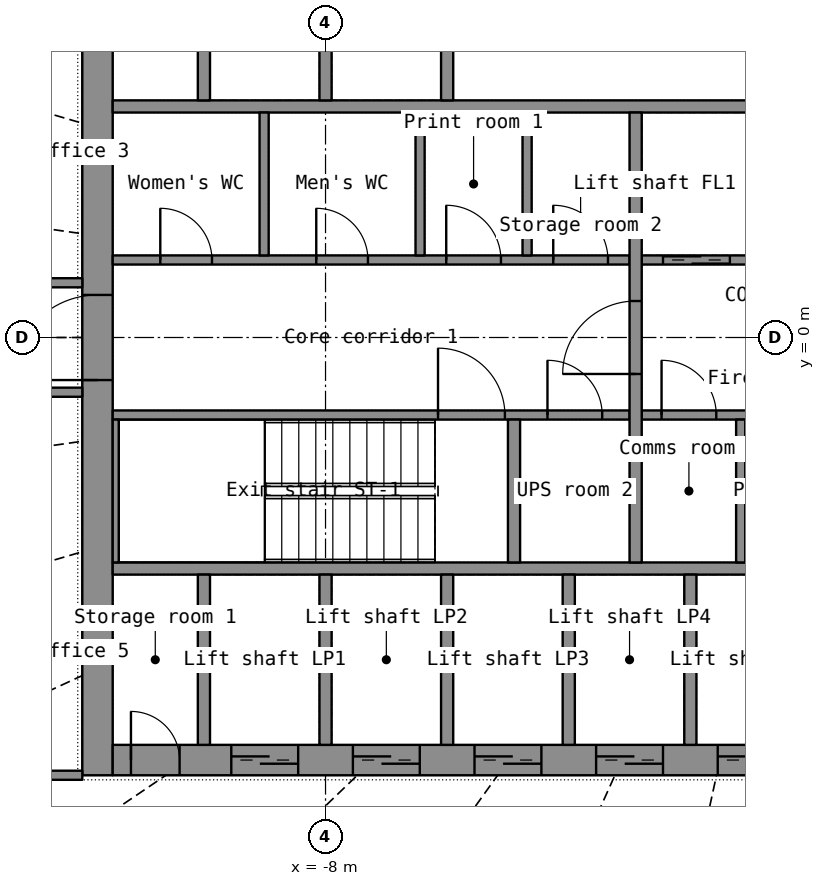
"""IFC4 building model, lengths in metres.
Left out: names, types, materials, properties, quantities, classifications, styles, units other than length and angle.
Written with IfcOpenShell. Run it as: python <this file> out.ifc"""

import sys

from ifc_helpers import new_model, si_unit, direction, frame, frame_2d, origin, place, context, subcontext, project, spatial, rectangle, extrude, element, fill, save


model = new_model("IFC4")
c1 = context("Model", 3, precision=1e-05, world=origin(), true_north=direction((0.0, 1.0)))
c2 = subcontext(c1, "Body", "Model", "MODEL_VIEW")
j1 = project(units=[si_unit("LENGTHUNIT", "METRE"), si_unit("PLANEANGLEUNIT", "RADIAN")], contexts=[c1])
p1 = place(None, origin())
s1 = spatial("IfcSite", under=j1, at=p1, CompositionType="ELEMENT")
p2 = place(p1, origin())
s2 = spatial("IfcBuilding", under=s1, at=p2, CompositionType="ELEMENT")
p3 = place(p2, frame((0.0, 0.0, 97.1)))
s3 = spatial("IfcBuildingStorey", under=s2, at=p3, CompositionType="ELEMENT", Elevation=97.1)
p4 = place(p3, frame((-11.75, -7.2, 0.0), z_axis=(0.0, 0.0, 1.0), x_axis=(0.0, 1.0, 0.0)))
e1 = element("IfcWall", 1, at=p4, inside=s3, PredefinedType="SHEAR", context=c2, shape_type="SweptSolid", body=[
    extrude(rectangle(XDim=14.4, YDim=0.5, at=frame_2d((7.2, 0.0))), origin(), (0.0, 0.0, 1.0), 3.3),
])
p5 = place(p4, frame((6.5, 0.0, 0.0)))
e2 = element("IfcOpeningElement", 2, at=p5, cuts=e1, PredefinedType="OPENING", context=c2, shape_type="SweptSolid", body=[
    extrude(rectangle(XDim=1.4, YDim=2.2, at=frame_2d((0.7, 1.1))), frame((0.0, 0.26, 0.0), z_axis=(0.0, -1.0, 0.0), x_axis=(1.0, 0.0, 0.0)), (0.0, 0.0, 1.0), 0.52),
])
p6 = place(p3, frame((-11.5, -6.95, 0.0), z_axis=(0.0, 0.0, 1.0), x_axis=(1.0, 0.0, 0.0)))
e3 = element("IfcWall", 3, at=p6, inside=s3, PredefinedType="SHEAR", context=c2, shape_type="SweptSolid", body=[
    extrude(rectangle(XDim=23.0, YDim=0.5, at=frame_2d((11.5, 0.0))), origin(), (0.0, 0.0, 1.0), 3.3),
])
p7 = place(p6, frame((1.95, 0.0, 0.0)))
e4 = element("IfcOpeningElement", 4, at=p7, cuts=e3, PredefinedType="OPENING", context=c2, shape_type="SweptSolid", body=[
    extrude(rectangle(XDim=1.1, YDim=2.2, at=frame_2d((0.55, 1.1))), frame((0.0, 0.26, 0.0), z_axis=(0.0, -1.0, 0.0), x_axis=(1.0, 0.0, 0.0)), (0.0, 0.0, 1.0), 0.52),
])
p8 = place(p6, frame((3.95, 0.0, 0.0)))
e5 = element("IfcOpeningElement", 5, at=p8, cuts=e3, PredefinedType="OPENING", context=c2, shape_type="SweptSolid", body=[
    extrude(rectangle(XDim=1.1, YDim=2.2, at=frame_2d((0.55, 1.1))), frame((0.0, 0.26, 0.0), z_axis=(0.0, -1.0, 0.0), x_axis=(1.0, 0.0, 0.0)), (0.0, 0.0, 1.0), 0.52),
])
p9 = place(p6, frame((5.95, 0.0, 0.0)))
e6 = element("IfcOpeningElement", 6, at=p9, cuts=e3, PredefinedType="OPENING", context=c2, shape_type="SweptSolid", body=[
    extrude(rectangle(XDim=1.1, YDim=2.2, at=frame_2d((0.55, 1.1))), frame((0.0, 0.26, 0.0), z_axis=(0.0, -1.0, 0.0), x_axis=(1.0, 0.0, 0.0)), (0.0, 0.0, 1.0), 0.52),
])
p10 = place(p6, frame((7.95, 0.0, 0.0)))
e7 = element("IfcOpeningElement", 7, at=p10, cuts=e3, PredefinedType="OPENING", context=c2, shape_type="SweptSolid", body=[
    extrude(rectangle(XDim=1.1, YDim=2.2, at=frame_2d((0.55, 1.1))), frame((0.0, 0.26, 0.0), z_axis=(0.0, -1.0, 0.0), x_axis=(1.0, 0.0, 0.0)), (0.0, 0.0, 1.0), 0.52),
])
p11 = place(p6, frame((9.95, 0.0, 0.0)))
e8 = element("IfcOpeningElement", 8, at=p11, cuts=e3, PredefinedType="OPENING", context=c2, shape_type="SweptSolid", body=[
    extrude(rectangle(XDim=1.1, YDim=2.2, at=frame_2d((0.55, 1.1))), frame((0.0, 0.26, 0.0), z_axis=(0.0, -1.0, 0.0), x_axis=(1.0, 0.0, 0.0)), (0.0, 0.0, 1.0), 0.52),
])
p12 = place(p6, frame((11.95, 0.0, 0.0)))
e9 = element("IfcOpeningElement", 9, at=p12, cuts=e3, PredefinedType="OPENING", context=c2, shape_type="SweptSolid", body=[
    extrude(rectangle(XDim=1.1, YDim=2.2, at=frame_2d((0.55, 1.1))), frame((0.0, 0.26, 0.0), z_axis=(0.0, -1.0, 0.0), x_axis=(1.0, 0.0, 0.0)), (0.0, 0.0, 1.0), 0.52),
])
p13 = place(p6, frame((13.95, 0.0, 0.0)))
e10 = element("IfcOpeningElement", 10, at=p13, cuts=e3, PredefinedType="OPENING", context=c2, shape_type="SweptSolid", body=[
    extrude(rectangle(XDim=1.1, YDim=2.2, at=frame_2d((0.55, 1.1))), frame((0.0, 0.26, 0.0), z_axis=(0.0, -1.0, 0.0), x_axis=(1.0, 0.0, 0.0)), (0.0, 0.0, 1.0), 0.52),
])
p14 = place(p6, frame((15.95, 0.0, 0.0)))
e11 = element("IfcOpeningElement", 11, at=p14, cuts=e3, PredefinedType="OPENING", context=c2, shape_type="SweptSolid", body=[
    extrude(rectangle(XDim=1.1, YDim=2.2, at=frame_2d((0.55, 1.1))), frame((0.0, 0.26, 0.0), z_axis=(0.0, -1.0, 0.0), x_axis=(1.0, 0.0, 0.0)), (0.0, 0.0, 1.0), 0.52),
])
p15 = place(p6, frame((19.95, 0.0, 0.0)))
e12 = element("IfcOpeningElement", 12, at=p15, cuts=e3, PredefinedType="OPENING", context=c2, shape_type="SweptSolid", body=[
    extrude(rectangle(XDim=1.1, YDim=2.2, at=frame_2d((0.55, 1.1))), frame((0.0, 0.26, 0.0), z_axis=(0.0, -1.0, 0.0), x_axis=(1.0, 0.0, 0.0)), (0.0, 0.0, 1.0), 0.52),
])
p16 = place(p6, frame((0.3, 0.0, 0.0)))
e13 = element("IfcOpeningElement", 13, at=p16, cuts=e3, PredefinedType="OPENING", context=c2, shape_type="SweptSolid", body=[
    extrude(rectangle(XDim=0.8, YDim=2.05, at=frame_2d((0.4, 1.025))), frame((0.0, 0.26, 0.0), z_axis=(0.0, -1.0, 0.0), x_axis=(1.0, 0.0, 0.0)), (0.0, 0.0, 1.0), 0.52),
])
p17 = place(p6, frame((21.9, 0.0, 0.0)))
e14 = element("IfcOpeningElement", 14, at=p17, cuts=e3, PredefinedType="OPENING", context=c2, shape_type="SweptSolid", body=[
    extrude(rectangle(XDim=0.8, YDim=2.05, at=frame_2d((0.4, 1.025))), frame((0.0, 0.26, 0.0), z_axis=(0.0, -1.0, 0.0), x_axis=(1.0, 0.0, 0.0)), (0.0, 0.0, 1.0), 0.52),
])
for number, where, z_axis, x_axis in (
    (15, (-11.5, -3.8, 0.0), (0.0, 0.0, 1.0), (1.0, 0.0, 0.0)),
    (16, (-11.5, 3.8, 0.0), (0.0, 0.0, 1.0), (1.0, 0.0, 0.0)),
):
    element("IfcWall", number, at=place(p3, frame(where, z_axis=z_axis, x_axis=x_axis)), inside=s3, PredefinedType="SHEAR", context=c2, shape_type="SweptSolid", body=[
        extrude(rectangle(XDim=23.0, YDim=0.2, at=frame_2d((11.5, 0.0))), origin(), (0.0, 0.0, 1.0), 3.3),
    ])
for number, where, z_axis, x_axis in (
    (17, (-10.0, -6.7, 0.0), (0.0, 0.0, 1.0), (0.0, 1.0, 0.0)),
    (18, (-8.0, -6.7, 0.0), (0.0, 0.0, 1.0), (0.0, 1.0, 0.0)),
    (19, (-6.0, -6.7, 0.0), (0.0, 0.0, 1.0), (0.0, 1.0, 0.0)),
    (20, (-4.0, -6.7, 0.0), (0.0, 0.0, 1.0), (0.0, 1.0, 0.0)),
    (21, (-2.0, -6.7, 0.0), (0.0, 0.0, 1.0), (0.0, 1.0, 0.0)),
    (22, (-10.0, 3.9, 0.0), (0.0, 0.0, 1.0), (0.0, 1.0, 0.0)),
    (23, (-8.0, 3.9, 0.0), (0.0, 0.0, 1.0), (0.0, 1.0, 0.0)),
    (24, (-6.0, 3.9, 0.0), (0.0, 0.0, 1.0), (0.0, 1.0, 0.0)),
):
    element("IfcWall", number, at=place(p3, frame(where, z_axis=z_axis, x_axis=x_axis)), inside=s3, PredefinedType="SHEAR", context=c2, shape_type="SweptSolid", body=[
        extrude(rectangle(XDim=2.8, YDim=0.2, at=frame_2d((1.4, 0.0))), origin(), (0.0, 0.0, 1.0), 3.3),
    ])
p18 = place(p3, frame((-11.5, -1.275, 0.0), z_axis=(0.0, 0.0, 1.0), x_axis=(1.0, 0.0, 0.0)))
e25 = element("IfcWall", 25, at=p18, inside=s3, PredefinedType="SHEAR", context=c2, shape_type="SweptSolid", body=[
    extrude(rectangle(XDim=8.5, YDim=0.15, at=frame_2d((4.25, 0.0))), origin(), (0.0, 0.0, 1.0), 3.3),
])
p19 = place(p18, frame((5.35, 0.0, 0.0)))
e26 = element("IfcOpeningElement", 26, at=p19, cuts=e25, PredefinedType="OPENING", context=c2, shape_type="SweptSolid", body=[
    extrude(rectangle(XDim=1.1, YDim=2.15, at=frame_2d((0.55, 1.075))), frame((0.0, 0.085, 0.0), z_axis=(0.0, -1.0, 0.0), x_axis=(1.0, 0.0, 0.0)), (0.0, 0.0, 1.0), 0.17),
])
p20 = place(p18, frame((7.15, 0.0, 0.0)))
e27 = element("IfcOpeningElement", 27, at=p20, cuts=e25, PredefinedType="OPENING", context=c2, shape_type="SweptSolid", body=[
    extrude(rectangle(XDim=0.9, YDim=2.1, at=frame_2d((0.45, 1.05))), frame((0.0, 0.085, 0.0), z_axis=(0.0, -1.0, 0.0), x_axis=(1.0, 0.0, 0.0)), (0.0, 0.0, 1.0), 0.17),
])
p21 = place(p3, frame((-2.8, -1.275, 0.0), z_axis=(0.0, 0.0, 1.0), x_axis=(1.0, 0.0, 0.0)))
e28 = element("IfcWall", 28, at=p21, inside=s3, PredefinedType="SHEAR", context=c2, shape_type="SweptSolid", body=[
    extrude(rectangle(XDim=5.6, YDim=0.15, at=frame_2d((2.8, 0.0))), origin(), (0.0, 0.0, 1.0), 3.3),
])
p22 = place(p21, frame((4.15, 0.0, 0.0)))
e29 = element("IfcOpeningElement", 29, at=p22, cuts=e28, PredefinedType="OPENING", context=c2, shape_type="SweptSolid", body=[
    extrude(rectangle(XDim=1.1, YDim=2.2, at=frame_2d((0.55, 1.1))), frame((0.0, 0.085, 0.0), z_axis=(0.0, -1.0, 0.0), x_axis=(1.0, 0.0, 0.0)), (0.0, 0.0, 1.0), 0.17),
])
p23 = place(p21, frame((0.326, 0.0, 0.0)))
e30 = element("IfcOpeningElement", 30, at=p23, cuts=e28, PredefinedType="OPENING", context=c2, shape_type="SweptSolid", body=[
    extrude(rectangle(XDim=0.9, YDim=2.1, at=frame_2d((0.45, 1.05))), frame((0.0, 0.085, 0.0), z_axis=(0.0, -1.0, 0.0), x_axis=(1.0, 0.0, 0.0)), (0.0, 0.0, 1.0), 0.17),
])
p24 = place(p21, frame((2.201, 0.0, 0.0)))
e31 = element("IfcOpeningElement", 31, at=p24, cuts=e28, PredefinedType="OPENING", context=c2, shape_type="SweptSolid", body=[
    extrude(rectangle(XDim=0.9, YDim=2.1, at=frame_2d((0.45, 1.05))), frame((0.0, 0.085, 0.0), z_axis=(0.0, -1.0, 0.0), x_axis=(1.0, 0.0, 0.0)), (0.0, 0.0, 1.0), 0.17),
])
p25 = place(p3, frame((-11.5, 1.275, 0.0), z_axis=(0.0, 0.0, 1.0), x_axis=(1.0, 0.0, 0.0)))
e32 = element("IfcWall", 32, at=p25, inside=s3, PredefinedType="PARTITIONING", context=c2, shape_type="SweptSolid", body=[
    extrude(rectangle(XDim=8.5, YDim=0.15, at=frame_2d((4.25, 0.0))), origin(), (0.0, 0.0, 1.0), 3.3),
])
p26 = place(p25, frame((0.782, 0.0, 0.0)))
e33 = element("IfcOpeningElement", 33, at=p26, cuts=e32, PredefinedType="OPENING", context=c2, shape_type="SweptSolid", body=[
    extrude(rectangle(XDim=0.85, YDim=2.1, at=frame_2d((0.425, 1.05))), frame((0.0, 0.085, 0.0), z_axis=(0.0, -1.0, 0.0), x_axis=(1.0, 0.0, 0.0)), (0.0, 0.0, 1.0), 0.17),
])
p27 = place(p25, frame((3.347, 0.0, 0.0)))
e34 = element("IfcOpeningElement", 34, at=p27, cuts=e32, PredefinedType="OPENING", context=c2, shape_type="SweptSolid", body=[
    extrude(rectangle(XDim=0.85, YDim=2.1, at=frame_2d((0.425, 1.05))), frame((0.0, 0.085, 0.0), z_axis=(0.0, -1.0, 0.0), x_axis=(1.0, 0.0, 0.0)), (0.0, 0.0, 1.0), 0.17),
])
p28 = place(p25, frame((5.485, 0.0, 0.0)))
e35 = element("IfcOpeningElement", 35, at=p28, cuts=e32, PredefinedType="OPENING", context=c2, shape_type="SweptSolid", body=[
    extrude(rectangle(XDim=0.9, YDim=2.1, at=frame_2d((0.45, 1.05))), frame((0.0, 0.085, 0.0), z_axis=(0.0, -1.0, 0.0), x_axis=(1.0, 0.0, 0.0)), (0.0, 0.0, 1.0), 0.17),
])
p29 = place(p25, frame((7.245, 0.0, 0.0)))
e36 = element("IfcOpeningElement", 36, at=p29, cuts=e32, PredefinedType="OPENING", context=c2, shape_type="SweptSolid", body=[
    extrude(rectangle(XDim=0.9, YDim=2.1, at=frame_2d((0.45, 1.05))), frame((0.0, 0.085, 0.0), z_axis=(0.0, -1.0, 0.0), x_axis=(1.0, 0.0, 0.0)), (0.0, 0.0, 1.0), 0.17),
])
p30 = place(p3, frame((-2.8, 1.275, 0.0), z_axis=(0.0, 0.0, 1.0), x_axis=(1.0, 0.0, 0.0)))
e37 = element("IfcWall", 37, at=p30, inside=s3, PredefinedType="SHEAR", context=c2, shape_type="SweptSolid", body=[
    extrude(rectangle(XDim=5.6, YDim=0.15, at=frame_2d((2.8, 0.0))), origin(), (0.0, 0.0, 1.0), 3.3),
])
p31 = place(p30, frame((0.35, 0.0, 0.0)))
e38 = element("IfcOpeningElement", 38, at=p31, cuts=e37, PredefinedType="OPENING", context=c2, shape_type="SweptSolid", body=[
    extrude(rectangle(XDim=1.1, YDim=2.2, at=frame_2d((0.55, 1.1))), frame((0.0, 0.085, 0.0), z_axis=(0.0, -1.0, 0.0), x_axis=(1.0, 0.0, 0.0)), (0.0, 0.0, 1.0), 0.17),
])
p32 = place(p30, frame((2.499, 0.0, 0.0)))
e39 = element("IfcOpeningElement", 39, at=p32, cuts=e37, PredefinedType="OPENING", context=c2, shape_type="SweptSolid", body=[
    extrude(rectangle(XDim=0.9, YDim=2.1, at=frame_2d((0.45, 1.05))), frame((0.0, 0.085, 0.0), z_axis=(0.0, -1.0, 0.0), x_axis=(1.0, 0.0, 0.0)), (0.0, 0.0, 1.0), 0.17),
])
p33 = place(p30, frame((4.374, 0.0, 0.0)))
e40 = element("IfcOpeningElement", 40, at=p33, cuts=e37, PredefinedType="OPENING", context=c2, shape_type="SweptSolid", body=[
    extrude(rectangle(XDim=0.9, YDim=2.1, at=frame_2d((0.45, 1.05))), frame((0.0, 0.085, 0.0), z_axis=(0.0, -1.0, 0.0), x_axis=(1.0, 0.0, 0.0)), (0.0, 0.0, 1.0), 0.17),
])
p34 = place(p3, frame((-2.9, -3.7, 0.0), z_axis=(0.0, 0.0, 1.0), x_axis=(0.0, 1.0, 0.0)))
e41 = element("IfcWall", 41, at=p34, inside=s3, PredefinedType="SHEAR", context=c2, shape_type="SweptSolid", body=[
    extrude(rectangle(XDim=7.4, YDim=0.2, at=frame_2d((3.7, 0.0))), origin(), (0.0, 0.0, 1.0), 3.3),
])
p35 = place(p34, frame((3.1, 0.0, 0.0)))
e42 = element("IfcOpeningElement", 42, at=p35, cuts=e41, PredefinedType="OPENING", context=c2, shape_type="SweptSolid", body=[
    extrude(rectangle(XDim=1.2, YDim=2.2, at=frame_2d((0.6, 1.1))), frame((0.0, 0.11, 0.0), z_axis=(0.0, -1.0, 0.0), x_axis=(1.0, 0.0, 0.0)), (0.0, 0.0, 1.0), 0.22),
])
p36 = place(p3, frame((-11.45, -3.7, 0.0), z_axis=(0.0, 0.0, 1.0), x_axis=(0.0, 1.0, 0.0)))
e43 = element("IfcWall", 43, at=p36, inside=s3, PredefinedType="SHEAR", context=c2, shape_type="SweptSolid", body=[
    extrude(rectangle(XDim=2.35, YDim=0.1, at=frame_2d((1.175, 0.0))), origin(), (0.0, 0.0, 1.0), 3.3),
])
p37 = place(p3, frame((-4.9, -3.7, 0.0), z_axis=(0.0, 0.0, 1.0), x_axis=(0.0, 1.0, 0.0)))
e44 = element("IfcWall", 44, at=p37, inside=s3, PredefinedType="SHEAR", context=c2, shape_type="SweptSolid", body=[
    extrude(rectangle(XDim=2.35, YDim=0.2, at=frame_2d((1.175, 0.0))), origin(), (0.0, 0.0, 1.0), 3.3),
])
for number, where, z_axis, x_axis in (
    (45, (-9.01, 1.35, 0.0), (0.0, 0.0, 1.0), (0.0, 1.0, 0.0)),
    (46, (-6.445, 1.35, 0.0), (0.0, 0.0, 1.0), (0.0, 1.0, 0.0)),
    (47, (-4.685, 1.35, 0.0), (0.0, 0.0, 1.0), (0.0, 1.0, 0.0)),
    (48, (-1.173, -3.7, 0.0), (0.0, 0.0, 1.0), (0.0, 1.0, 0.0)),
):
    element("IfcWall", number, at=place(p3, frame(where, z_axis=z_axis, x_axis=x_axis)), inside=s3, PredefinedType="PARTITIONING", context=c2, shape_type="SweptSolid", body=[
        extrude(rectangle(XDim=2.35, YDim=0.15, at=frame_2d((1.175, 0.0))), origin(), (0.0, 0.0, 1.0), 3.3),
    ])
for number, where, z_axis, x_axis in (
    (49, (-12.0, -7.2, 0.0), (0.0, 0.0, 1.0), (-1.0, 0.0, 0.0)),
    (50, (-12.0, 0.9, 0.0), (0.0, 0.0, 1.0), (-1.0, 0.0, 0.0)),
):
    element("IfcWall", number, at=place(p3, frame(where, z_axis=z_axis, x_axis=x_axis)), inside=s3, PredefinedType="PARTITIONING", context=c2, shape_type="SweptSolid", body=[
        extrude(rectangle(XDim=3.923, YDim=0.15, at=frame_2d((1.961, 0.0))), origin(), (0.0, 0.0, 1.0), 2.4),
    ])
p38 = place(p3, frame((-12.559, -0.9, 0.0), z_axis=(0.0, 0.0, 1.0), x_axis=(1.0, 0.0, 0.0)))
e51 = element("IfcWall", 51, at=p38, inside=s3, PredefinedType="PARTITIONING", context=c2, shape_type="SweptSolid", body=[
    extrude(rectangle(XDim=0.559, YDim=0.15, at=frame_2d((0.279, 0.0))), origin(), (0.0, 0.0, 1.0), 2.4),
])
p39 = place(p7, origin())
e52 = element("IfcDoor", 52, at=p39, inside=s3, OperationType="DOUBLE_DOOR_SLIDING", PredefinedType="DOOR", context=c2, shape_type="SweptSolid", body=[
    extrude(rectangle(XDim=1.1, YDim=2.2, at=frame_2d((0.55, 1.1))), frame((0.0, 0.025, 0.0), z_axis=(0.0, -1.0, 0.0), x_axis=(1.0, 0.0, 0.0)), (0.0, 0.0, 1.0), 0.05),
])
fill(e4, e52)
p40 = place(p8, origin())
e53 = element("IfcDoor", 53, at=p40, inside=s3, OperationType="DOUBLE_DOOR_SLIDING", PredefinedType="DOOR", context=c2, shape_type="SweptSolid", body=[
    extrude(rectangle(XDim=1.1, YDim=2.2, at=frame_2d((0.55, 1.1))), frame((0.0, 0.025, 0.0), z_axis=(0.0, -1.0, 0.0), x_axis=(1.0, 0.0, 0.0)), (0.0, 0.0, 1.0), 0.05),
])
fill(e5, e53)
p41 = place(p9, origin())
e54 = element("IfcDoor", 54, at=p41, inside=s3, OperationType="DOUBLE_DOOR_SLIDING", PredefinedType="DOOR", context=c2, shape_type="SweptSolid", body=[
    extrude(rectangle(XDim=1.1, YDim=2.2, at=frame_2d((0.55, 1.1))), frame((0.0, 0.025, 0.0), z_axis=(0.0, -1.0, 0.0), x_axis=(1.0, 0.0, 0.0)), (0.0, 0.0, 1.0), 0.05),
])
fill(e6, e54)
p42 = place(p10, origin())
e55 = element("IfcDoor", 55, at=p42, inside=s3, OperationType="DOUBLE_DOOR_SLIDING", PredefinedType="DOOR", context=c2, shape_type="SweptSolid", body=[
    extrude(rectangle(XDim=1.1, YDim=2.2, at=frame_2d((0.55, 1.1))), frame((0.0, 0.025, 0.0), z_axis=(0.0, -1.0, 0.0), x_axis=(1.0, 0.0, 0.0)), (0.0, 0.0, 1.0), 0.05),
])
fill(e7, e55)
p43 = place(p11, origin())
e56 = element("IfcDoor", 56, at=p43, inside=s3, OperationType="DOUBLE_DOOR_SLIDING", PredefinedType="DOOR", context=c2, shape_type="SweptSolid", body=[
    extrude(rectangle(XDim=1.1, YDim=2.2, at=frame_2d((0.55, 1.1))), frame((0.0, 0.025, 0.0), z_axis=(0.0, -1.0, 0.0), x_axis=(1.0, 0.0, 0.0)), (0.0, 0.0, 1.0), 0.05),
])
fill(e8, e56)
p44 = place(p16, origin())
e57 = element("IfcDoor", 57, at=p44, inside=s3, OperationType="SINGLE_SWING_LEFT", PredefinedType="DOOR", context=c2, shape_type="SweptSolid", body=[
    extrude(rectangle(XDim=0.8, YDim=2.05, at=frame_2d((0.4, 1.025))), frame((0.0, 0.025, 0.0), z_axis=(0.0, -1.0, 0.0), x_axis=(1.0, 0.0, 0.0)), (0.0, 0.0, 1.0), 0.05),
])
fill(e13, e57)
p45 = place(p5, origin())
e58 = element("IfcDoor", 58, at=p45, inside=s3, OperationType="DOUBLE_DOOR_SINGLE_SWING", PredefinedType="DOOR", context=c2, shape_type="SweptSolid", body=[
    extrude(rectangle(XDim=1.4, YDim=2.2, at=frame_2d((0.7, 1.1))), frame((0.0, 0.025, 0.0), z_axis=(0.0, -1.0, 0.0), x_axis=(1.0, 0.0, 0.0)), (0.0, 0.0, 1.0), 0.05),
])
fill(e2, e58)
p46 = place(p35, origin())
e59 = element("IfcDoor", 59, at=p46, inside=s3, OperationType="SINGLE_SWING_LEFT", PredefinedType="DOOR", context=c2, shape_type="SweptSolid", body=[
    extrude(rectangle(XDim=1.2, YDim=2.2, at=frame_2d((0.6, 1.1))), frame((0.0, 0.025, 0.0), z_axis=(0.0, -1.0, 0.0), x_axis=(1.0, 0.0, 0.0)), (0.0, 0.0, 1.0), 0.05),
])
fill(e42, e59)
p47 = place(p31, origin())
e60 = element("IfcDoor", 60, at=p47, inside=s3, OperationType="DOUBLE_DOOR_SLIDING", PredefinedType="DOOR", context=c2, shape_type="SweptSolid", body=[
    extrude(rectangle(XDim=1.1, YDim=2.2, at=frame_2d((0.55, 1.1))), frame((0.0, 0.025, 0.0), z_axis=(0.0, -1.0, 0.0), x_axis=(1.0, 0.0, 0.0)), (0.0, 0.0, 1.0), 0.05),
])
fill(e38, e60)
p48 = place(p19, origin())
e61 = element("IfcDoor", 61, at=p48, inside=s3, OperationType="SINGLE_SWING_LEFT", PredefinedType="DOOR", context=c2, shape_type="SweptSolid", body=[
    extrude(rectangle(XDim=1.1, YDim=2.15, at=frame_2d((0.55, 1.075))), frame((0.0, 0.025, 0.0), z_axis=(0.0, -1.0, 0.0), x_axis=(1.0, 0.0, 0.0)), (0.0, 0.0, 1.0), 0.05),
])
fill(e26, e61)
p49 = place(p26, origin())
e62 = element("IfcDoor", 62, at=p49, inside=s3, OperationType="SINGLE_SWING_LEFT", PredefinedType="DOOR", context=c2, shape_type="SweptSolid", body=[
    extrude(rectangle(XDim=0.85, YDim=2.1, at=frame_2d((0.425, 1.05))), frame((0.0, 0.025, 0.0), z_axis=(0.0, -1.0, 0.0), x_axis=(1.0, 0.0, 0.0)), (0.0, 0.0, 1.0), 0.05),
])
fill(e33, e62)
p50 = place(p27, origin())
e63 = element("IfcDoor", 63, at=p50, inside=s3, OperationType="SINGLE_SWING_LEFT", PredefinedType="DOOR", context=c2, shape_type="SweptSolid", body=[
    extrude(rectangle(XDim=0.85, YDim=2.1, at=frame_2d((0.425, 1.05))), frame((0.0, 0.025, 0.0), z_axis=(0.0, -1.0, 0.0), x_axis=(1.0, 0.0, 0.0)), (0.0, 0.0, 1.0), 0.05),
])
fill(e34, e63)
p51 = place(p28, origin())
e64 = element("IfcDoor", 64, at=p51, inside=s3, OperationType="SINGLE_SWING_LEFT", PredefinedType="DOOR", context=c2, shape_type="SweptSolid", body=[
    extrude(rectangle(XDim=0.9, YDim=2.1, at=frame_2d((0.45, 1.05))), frame((0.0, 0.025, 0.0), z_axis=(0.0, -1.0, 0.0), x_axis=(1.0, 0.0, 0.0)), (0.0, 0.0, 1.0), 0.05),
])
fill(e35, e64)
p52 = place(p29, origin())
e65 = element("IfcDoor", 65, at=p52, inside=s3, OperationType="SINGLE_SWING_LEFT", PredefinedType="DOOR", context=c2, shape_type="SweptSolid", body=[
    extrude(rectangle(XDim=0.9, YDim=2.1, at=frame_2d((0.45, 1.05))), frame((0.0, 0.025, 0.0), z_axis=(0.0, -1.0, 0.0), x_axis=(1.0, 0.0, 0.0)), (0.0, 0.0, 1.0), 0.05),
])
fill(e36, e65)
p53 = place(p23, origin())
e66 = element("IfcDoor", 66, at=p53, inside=s3, OperationType="SINGLE_SWING_LEFT", PredefinedType="DOOR", context=c2, shape_type="SweptSolid", body=[
    extrude(rectangle(XDim=0.9, YDim=2.1, at=frame_2d((0.45, 1.05))), frame((0.0, 0.025, 0.0), z_axis=(0.0, -1.0, 0.0), x_axis=(1.0, 0.0, 0.0)), (0.0, 0.0, 1.0), 0.05),
])
fill(e30, e66)
p54 = place(p20, origin())
e67 = element("IfcDoor", 67, at=p54, inside=s3, OperationType="SINGLE_SWING_LEFT", PredefinedType="DOOR", context=c2, shape_type="SweptSolid", body=[
    extrude(rectangle(XDim=0.9, YDim=2.1, at=frame_2d((0.45, 1.05))), frame((0.0, 0.025, 0.0), z_axis=(0.0, -1.0, 0.0), x_axis=(1.0, 0.0, 0.0)), (0.0, 0.0, 1.0), 0.05),
])
fill(e27, e67)
save(model, sys.argv[1])
